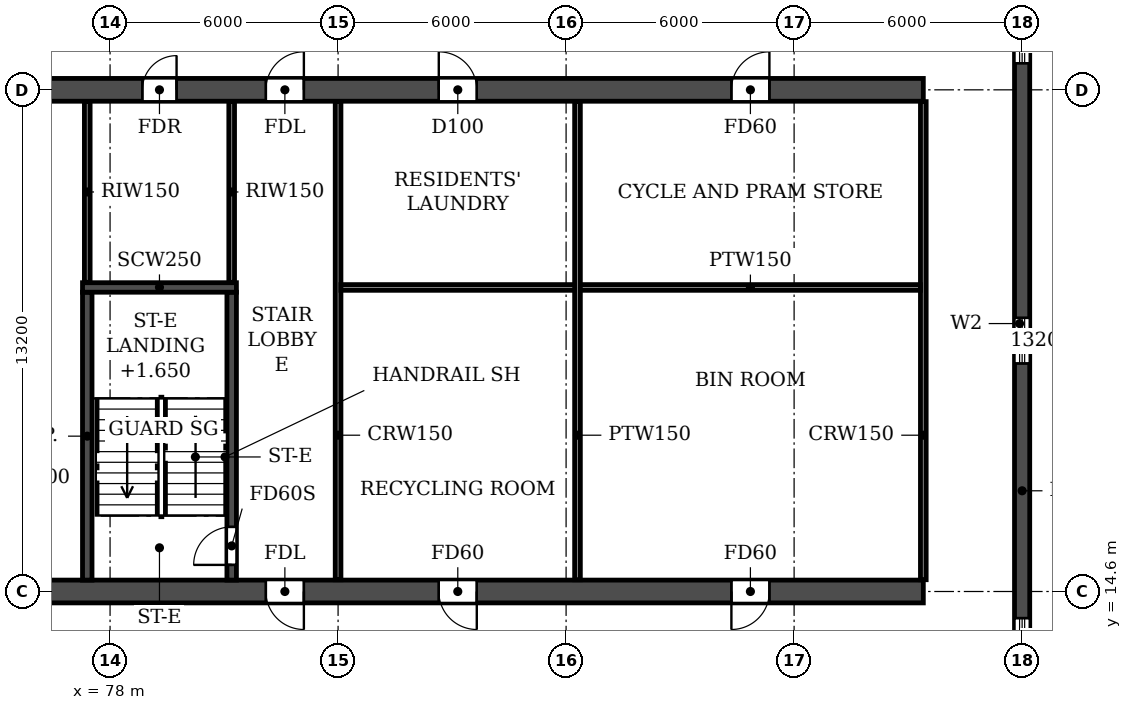
"""IFC4 building model, lengths in metres.
Left out: names, types, materials, properties, quantities, classifications, styles, units other than length and angle.
Written with IfcOpenShell. Run it as: python <this file> out.ifc"""

import sys

from ifc_helpers import new_model, si_unit, direction, frame, frame_2d, origin, place, context, subcontext, project, spatial, rectangle, extrude, element, fill, save


model = new_model("IFC4")
c1 = context("Model", 3, precision=1e-05, world=origin(), true_north=direction((0.0, 1.0)))
c2 = subcontext(c1, "Body", "Model", "MODEL_VIEW")
j1 = project(units=[si_unit("LENGTHUNIT", "METRE"), si_unit("PLANEANGLEUNIT", "RADIAN")], contexts=[c1])
p1 = place(None, origin())
s1 = spatial("IfcSite", under=j1, at=p1, CompositionType="ELEMENT")
p2 = place(p1, origin())
s2 = spatial("IfcBuilding", under=s1, at=p2, CompositionType="ELEMENT")
p3 = place(p2, frame((0.0, 0.0, 49.8)))
s3 = spatial("IfcBuildingStorey", under=s2, at=p3, CompositionType="ELEMENT", Elevation=49.8)
p4 = place(p3, frame((102.0, 4.683, 0.0), z_axis=(0.0, 0.0, 1.0), x_axis=(0.0, 1.0, 0.0)))
e1 = element("IfcWall", 1, at=p4, inside=s3, PredefinedType="SHEAR", context=c2, shape_type="SweptSolid", body=[
    extrude(rectangle(XDim=35.434, YDim=0.4, at=frame_2d((17.717, 0.0))), origin(), (0.0, 0.0, 1.0), 3.0),
])
p5 = place(p4, frame((15.917, 0.0, 0.9)))
e2 = element("IfcOpeningElement", 2, at=p5, cuts=e1, PredefinedType="OPENING", context=c2, shape_type="SweptSolid", body=[
    extrude(rectangle(XDim=1.2, YDim=1.5, at=frame_2d((0.6, 0.75))), frame((0.0, 0.21, 0.0), z_axis=(0.0, -1.0, 0.0), x_axis=(1.0, 0.0, 0.0)), (0.0, 0.0, 1.0), 0.42),
])
p6 = place(p4, frame((23.817, 0.0, 0.9)))
e3 = element("IfcOpeningElement", 3, at=p6, cuts=e1, PredefinedType="OPENING", context=c2, shape_type="SweptSolid", body=[
    extrude(rectangle(XDim=1.2, YDim=1.5, at=frame_2d((0.6, 0.75))), frame((0.0, 0.21, 0.0), z_axis=(0.0, -1.0, 0.0), x_axis=(1.0, 0.0, 0.0)), (0.0, 0.0, 1.0), 0.42),
])
p7 = place(p4, frame((8.017, 0.0, 0.9)))
e4 = element("IfcOpeningElement", 4, at=p7, cuts=e1, PredefinedType="OPENING", context=c2, shape_type="SweptSolid", body=[
    extrude(rectangle(XDim=1.2, YDim=1.5, at=frame_2d((0.6, 0.75))), frame((0.0, 0.21, 0.0), z_axis=(0.0, -1.0, 0.0), x_axis=(1.0, 0.0, 0.0)), (0.0, 0.0, 1.0), 0.42),
])
p8 = place(p4, frame((29.493, 0.0, 0.6)))
e5 = element("IfcOpeningElement", 5, at=p8, cuts=e1, PredefinedType="OPENING", context=c2, shape_type="SweptSolid", body=[
    extrude(rectangle(XDim=2.2, YDim=1.8, at=frame_2d((1.1, 0.9))), frame((0.0, 0.21, 0.0), z_axis=(0.0, -1.0, 0.0), x_axis=(1.0, 0.0, 0.0)), (0.0, 0.0, 1.0), 0.42),
])
p9 = place(p4, frame((2.541, 0.0, 0.6)))
e6 = element("IfcOpeningElement", 6, at=p9, cuts=e1, PredefinedType="OPENING", context=c2, shape_type="SweptSolid", body=[
    extrude(rectangle(XDim=2.2, YDim=1.8, at=frame_2d((1.1, 0.9))), frame((0.0, 0.21, 0.0), z_axis=(0.0, -1.0, 0.0), x_axis=(1.0, 0.0, 0.0)), (0.0, 0.0, 1.0), 0.42),
])
p10 = place(p3, frame((2.6, 14.6, 0.0), z_axis=(0.0, 0.0, 1.0), x_axis=(1.0, 0.0, 0.0)))
e7 = element("IfcWall", 7, at=p10, inside=s3, PredefinedType="SOLIDWALL", context=c2, shape_type="SweptSolid", body=[
    extrude(rectangle(XDim=96.8, YDim=0.6, at=frame_2d((48.4, 0.0))), origin(), (0.0, 0.0, 1.0), 3.0),
])
p11 = place(p10, frame((3.05, 0.0, 0.0)))
e8 = element("IfcOpeningElement", 8, at=p11, cuts=e7, PredefinedType="OPENING", context=c2, shape_type="SweptSolid", body=[
    extrude(rectangle(XDim=1.5, YDim=2.1, at=frame_2d((0.75, 1.05))), frame((0.0, 0.31, 0.0), z_axis=(0.0, -1.0, 0.0), x_axis=(1.0, 0.0, 0.0)), (0.0, 0.0, 1.0), 0.62),
])
p12 = place(p10, frame((10.75, 0.0, 0.0)))
e9 = element("IfcOpeningElement", 9, at=p12, cuts=e7, PredefinedType="OPENING", context=c2, shape_type="SweptSolid", body=[
    extrude(rectangle(XDim=1.5, YDim=2.1, at=frame_2d((0.75, 1.05))), frame((0.0, 0.31, 0.0), z_axis=(0.0, -1.0, 0.0), x_axis=(1.0, 0.0, 0.0)), (0.0, 0.0, 1.0), 0.62),
])
p13 = place(p10, frame((16.3, 0.0, 0.0)))
e10 = element("IfcOpeningElement", 10, at=p13, cuts=e7, PredefinedType="OPENING", context=c2, shape_type="SweptSolid", body=[
    extrude(rectangle(XDim=1.0, YDim=2.1, at=frame_2d((0.5, 1.05))), frame((0.0, 0.31, 0.0), z_axis=(0.0, -1.0, 0.0), x_axis=(1.0, 0.0, 0.0)), (0.0, 0.0, 1.0), 0.62),
])
p14 = place(p10, frame((24.2, 0.0, 0.0)))
e11 = element("IfcOpeningElement", 11, at=p14, cuts=e7, PredefinedType="OPENING", context=c2, shape_type="SweptSolid", body=[
    extrude(rectangle(XDim=1.0, YDim=2.1, at=frame_2d((0.5, 1.05))), frame((0.0, 0.31, 0.0), z_axis=(0.0, -1.0, 0.0), x_axis=(1.0, 0.0, 0.0)), (0.0, 0.0, 1.0), 0.62),
])
p15 = place(p10, frame((28.8, 0.0, 0.0)))
e12 = element("IfcOpeningElement", 12, at=p15, cuts=e7, PredefinedType="OPENING", context=c2, shape_type="SweptSolid", body=[
    extrude(rectangle(XDim=1.0, YDim=2.1, at=frame_2d((0.5, 1.05))), frame((0.0, 0.31, 0.0), z_axis=(0.0, -1.0, 0.0), x_axis=(1.0, 0.0, 0.0)), (0.0, 0.0, 1.0), 0.62),
])
p16 = place(p10, frame((42.7, 0.0, 0.0)))
e13 = element("IfcOpeningElement", 13, at=p16, cuts=e7, PredefinedType="OPENING", context=c2, shape_type="SweptSolid", body=[
    extrude(rectangle(XDim=1.0, YDim=2.1, at=frame_2d((0.5, 1.05))), frame((0.0, 0.31, 0.0), z_axis=(0.0, -1.0, 0.0), x_axis=(1.0, 0.0, 0.0)), (0.0, 0.0, 1.0), 0.62),
])
p17 = place(p10, frame((47.9, 0.0, 0.0)))
e14 = element("IfcOpeningElement", 14, at=p17, cuts=e7, PredefinedType="OPENING", context=c2, shape_type="SweptSolid", body=[
    extrude(rectangle(XDim=1.0, YDim=2.1, at=frame_2d((0.5, 1.05))), frame((0.0, 0.31, 0.0), z_axis=(0.0, -1.0, 0.0), x_axis=(1.0, 0.0, 0.0)), (0.0, 0.0, 1.0), 0.62),
])
p18 = place(p10, frame((51.8, 0.0, 0.0)))
e15 = element("IfcOpeningElement", 15, at=p18, cuts=e7, PredefinedType="OPENING", context=c2, shape_type="SweptSolid", body=[
    extrude(rectangle(XDim=1.0, YDim=2.1, at=frame_2d((0.5, 1.05))), frame((0.0, 0.31, 0.0), z_axis=(0.0, -1.0, 0.0), x_axis=(1.0, 0.0, 0.0)), (0.0, 0.0, 1.0), 0.62),
])
p19 = place(p10, frame((55.7, 0.0, 0.0)))
e16 = element("IfcOpeningElement", 16, at=p19, cuts=e7, PredefinedType="OPENING", context=c2, shape_type="SweptSolid", body=[
    extrude(rectangle(XDim=1.0, YDim=2.1, at=frame_2d((0.5, 1.05))), frame((0.0, 0.31, 0.0), z_axis=(0.0, -1.0, 0.0), x_axis=(1.0, 0.0, 0.0)), (0.0, 0.0, 1.0), 0.62),
])
p20 = place(p10, frame((67.0, 0.0, 0.0)))
e17 = element("IfcOpeningElement", 17, at=p20, cuts=e7, PredefinedType="OPENING", context=c2, shape_type="SweptSolid", body=[
    extrude(rectangle(XDim=1.0, YDim=2.1, at=frame_2d((0.5, 1.05))), frame((0.0, 0.31, 0.0), z_axis=(0.0, -1.0, 0.0), x_axis=(1.0, 0.0, 0.0)), (0.0, 0.0, 1.0), 0.62),
])
p21 = place(p10, frame((71.6, 0.0, 0.0)))
e18 = element("IfcOpeningElement", 18, at=p21, cuts=e7, PredefinedType="OPENING", context=c2, shape_type="SweptSolid", body=[
    extrude(rectangle(XDim=1.0, YDim=2.1, at=frame_2d((0.5, 1.05))), frame((0.0, 0.31, 0.0), z_axis=(0.0, -1.0, 0.0), x_axis=(1.0, 0.0, 0.0)), (0.0, 0.0, 1.0), 0.62),
])
p22 = place(p10, frame((79.5, 0.0, 0.0)))
e19 = element("IfcOpeningElement", 19, at=p22, cuts=e7, PredefinedType="OPENING", context=c2, shape_type="SweptSolid", body=[
    extrude(rectangle(XDim=1.0, YDim=2.1, at=frame_2d((0.5, 1.05))), frame((0.0, 0.31, 0.0), z_axis=(0.0, -1.0, 0.0), x_axis=(1.0, 0.0, 0.0)), (0.0, 0.0, 1.0), 0.62),
])
p23 = place(p10, frame((84.05, 0.0, 0.0)))
e20 = element("IfcOpeningElement", 20, at=p23, cuts=e7, PredefinedType="OPENING", context=c2, shape_type="SweptSolid", body=[
    extrude(rectangle(XDim=1.0, YDim=2.1, at=frame_2d((0.5, 1.05))), frame((0.0, 0.31, 0.0), z_axis=(0.0, -1.0, 0.0), x_axis=(1.0, 0.0, 0.0)), (0.0, 0.0, 1.0), 0.62),
])
p24 = place(p10, frame((91.75, 0.0, 0.0)))
e21 = element("IfcOpeningElement", 21, at=p24, cuts=e7, PredefinedType="OPENING", context=c2, shape_type="SweptSolid", body=[
    extrude(rectangle(XDim=1.0, YDim=2.1, at=frame_2d((0.5, 1.05))), frame((0.0, 0.31, 0.0), z_axis=(0.0, -1.0, 0.0), x_axis=(1.0, 0.0, 0.0)), (0.0, 0.0, 1.0), 0.62),
])
p25 = place(p3, frame((2.6, 27.8, 0.0), z_axis=(0.0, 0.0, 1.0), x_axis=(1.0, 0.0, 0.0)))
e22 = element("IfcWall", 22, at=p25, inside=s3, PredefinedType="SOLIDWALL", context=c2, shape_type="SweptSolid", body=[
    extrude(rectangle(XDim=96.8, YDim=0.6, at=frame_2d((48.4, 0.0))), origin(), (0.0, 0.0, 1.0), 3.0),
])
p26 = place(p25, frame((7.2, 0.0, 0.0)))
e23 = element("IfcOpeningElement", 23, at=p26, cuts=e22, PredefinedType="OPENING", context=c2, shape_type="SweptSolid", body=[
    extrude(rectangle(XDim=1.0, YDim=2.1, at=frame_2d((0.5, 1.05))), frame((0.0, 0.31, 0.0), z_axis=(0.0, -1.0, 0.0), x_axis=(1.0, 0.0, 0.0)), (0.0, 0.0, 1.0), 0.62),
])
p27 = place(p25, frame((16.3, 0.0, 0.0)))
e24 = element("IfcOpeningElement", 24, at=p27, cuts=e22, PredefinedType="OPENING", context=c2, shape_type="SweptSolid", body=[
    extrude(rectangle(XDim=1.0, YDim=2.1, at=frame_2d((0.5, 1.05))), frame((0.0, 0.31, 0.0), z_axis=(0.0, -1.0, 0.0), x_axis=(1.0, 0.0, 0.0)), (0.0, 0.0, 1.0), 0.62),
])
p28 = place(p25, frame((19.65, 0.0, 0.0)))
e25 = element("IfcOpeningElement", 25, at=p28, cuts=e22, PredefinedType="OPENING", context=c2, shape_type="SweptSolid", body=[
    extrude(rectangle(XDim=0.9, YDim=2.1, at=frame_2d((0.45, 1.05))), frame((0.0, 0.31, 0.0), z_axis=(0.0, -1.0, 0.0), x_axis=(1.0, 0.0, 0.0)), (0.0, 0.0, 1.0), 0.62),
])
p29 = place(p25, frame((28.85, 0.0, 0.0)))
e26 = element("IfcOpeningElement", 26, at=p29, cuts=e22, PredefinedType="OPENING", context=c2, shape_type="SweptSolid", body=[
    extrude(rectangle(XDim=0.9, YDim=2.1, at=frame_2d((0.45, 1.05))), frame((0.0, 0.31, 0.0), z_axis=(0.0, -1.0, 0.0), x_axis=(1.0, 0.0, 0.0)), (0.0, 0.0, 1.0), 0.62),
])
p30 = place(p25, frame((33.3, 0.0, 0.0)))
e27 = element("IfcOpeningElement", 27, at=p30, cuts=e22, PredefinedType="OPENING", context=c2, shape_type="SweptSolid", body=[
    extrude(rectangle(XDim=1.0, YDim=2.1, at=frame_2d((0.5, 1.05))), frame((0.0, 0.31, 0.0), z_axis=(0.0, -1.0, 0.0), x_axis=(1.0, 0.0, 0.0)), (0.0, 0.0, 1.0), 0.62),
])
p31 = place(p25, frame((38.25, 0.0, 0.0)))
e28 = element("IfcOpeningElement", 28, at=p31, cuts=e22, PredefinedType="OPENING", context=c2, shape_type="SweptSolid", body=[
    extrude(rectangle(XDim=1.5, YDim=2.1, at=frame_2d((0.75, 1.05))), frame((0.0, 0.31, 0.0), z_axis=(0.0, -1.0, 0.0), x_axis=(1.0, 0.0, 0.0)), (0.0, 0.0, 1.0), 0.62),
])
p32 = place(p25, frame((45.0, 0.0, 0.0)))
e29 = element("IfcOpeningElement", 29, at=p32, cuts=e22, PredefinedType="OPENING", context=c2, shape_type="SweptSolid", body=[
    extrude(rectangle(XDim=1.0, YDim=2.1, at=frame_2d((0.5, 1.05))), frame((0.0, 0.31, 0.0), z_axis=(0.0, -1.0, 0.0), x_axis=(1.0, 0.0, 0.0)), (0.0, 0.0, 1.0), 0.62),
])
p33 = place(p25, frame((47.9, 0.0, 0.0)))
e30 = element("IfcOpeningElement", 30, at=p33, cuts=e22, PredefinedType="OPENING", context=c2, shape_type="SweptSolid", body=[
    extrude(rectangle(XDim=1.0, YDim=2.1, at=frame_2d((0.5, 1.05))), frame((0.0, 0.31, 0.0), z_axis=(0.0, -1.0, 0.0), x_axis=(1.0, 0.0, 0.0)), (0.0, 0.0, 1.0), 0.62),
])
p34 = place(p25, frame((52.1, 0.0, 0.0)))
e31 = element("IfcOpeningElement", 31, at=p34, cuts=e22, PredefinedType="OPENING", context=c2, shape_type="SweptSolid", body=[
    extrude(rectangle(XDim=1.0, YDim=2.1, at=frame_2d((0.5, 1.05))), frame((0.0, 0.31, 0.0), z_axis=(0.0, -1.0, 0.0), x_axis=(1.0, 0.0, 0.0)), (0.0, 0.0, 1.0), 0.62),
])
p35 = place(p25, frame((56.0, 0.0, 0.0)))
e32 = element("IfcOpeningElement", 32, at=p35, cuts=e22, PredefinedType="OPENING", context=c2, shape_type="SweptSolid", body=[
    extrude(rectangle(XDim=1.0, YDim=2.1, at=frame_2d((0.5, 1.05))), frame((0.0, 0.31, 0.0), z_axis=(0.0, -1.0, 0.0), x_axis=(1.0, 0.0, 0.0)), (0.0, 0.0, 1.0), 0.62),
])
p36 = place(p25, frame((61.2, 0.0, 0.0)))
e33 = element("IfcOpeningElement", 33, at=p36, cuts=e22, PredefinedType="OPENING", context=c2, shape_type="SweptSolid", body=[
    extrude(rectangle(XDim=1.0, YDim=2.1, at=frame_2d((0.5, 1.05))), frame((0.0, 0.31, 0.0), z_axis=(0.0, -1.0, 0.0), x_axis=(1.0, 0.0, 0.0)), (0.0, 0.0, 1.0), 0.62),
])
p37 = place(p25, frame((67.05, 0.0, 0.0)))
e34 = element("IfcOpeningElement", 34, at=p37, cuts=e22, PredefinedType="OPENING", context=c2, shape_type="SweptSolid", body=[
    extrude(rectangle(XDim=0.9, YDim=2.1, at=frame_2d((0.45, 1.05))), frame((0.0, 0.31, 0.0), z_axis=(0.0, -1.0, 0.0), x_axis=(1.0, 0.0, 0.0)), (0.0, 0.0, 1.0), 0.62),
])
p38 = place(p25, frame((76.25, 0.0, 0.0)))
e35 = element("IfcOpeningElement", 35, at=p38, cuts=e22, PredefinedType="OPENING", context=c2, shape_type="SweptSolid", body=[
    extrude(rectangle(XDim=0.9, YDim=2.1, at=frame_2d((0.45, 1.05))), frame((0.0, 0.31, 0.0), z_axis=(0.0, -1.0, 0.0), x_axis=(1.0, 0.0, 0.0)), (0.0, 0.0, 1.0), 0.62),
])
p39 = place(p25, frame((79.5, 0.0, 0.0)))
e36 = element("IfcOpeningElement", 36, at=p39, cuts=e22, PredefinedType="OPENING", context=c2, shape_type="SweptSolid", body=[
    extrude(rectangle(XDim=1.0, YDim=2.1, at=frame_2d((0.5, 1.05))), frame((0.0, 0.31, 0.0), z_axis=(0.0, -1.0, 0.0), x_axis=(1.0, 0.0, 0.0)), (0.0, 0.0, 1.0), 0.62),
])
p40 = place(p25, frame((84.05, 0.0, 0.0)))
e37 = element("IfcOpeningElement", 37, at=p40, cuts=e22, PredefinedType="OPENING", context=c2, shape_type="SweptSolid", body=[
    extrude(rectangle(XDim=1.0, YDim=2.1, at=frame_2d((0.5, 1.05))), frame((0.0, 0.31, 0.0), z_axis=(0.0, -1.0, 0.0), x_axis=(1.0, 0.0, 0.0)), (0.0, 0.0, 1.0), 0.62),
])
p41 = place(p25, frame((91.75, 0.0, 0.0)))
e38 = element("IfcOpeningElement", 38, at=p41, cuts=e22, PredefinedType="OPENING", context=c2, shape_type="SweptSolid", body=[
    extrude(rectangle(XDim=1.0, YDim=2.1, at=frame_2d((0.5, 1.05))), frame((0.0, 0.31, 0.0), z_axis=(0.0, -1.0, 0.0), x_axis=(1.0, 0.0, 0.0)), (0.0, 0.0, 1.0), 0.62),
])
p42 = place(p3, frame((77.4, 14.9, 0.0), z_axis=(0.0, 0.0, 1.0), x_axis=(0.0, 1.0, 0.0)))
e39 = element("IfcWall", 39, at=p42, inside=s3, PredefinedType="SOLIDWALL", context=c2, shape_type="SweptSolid", body=[
    extrude(rectangle(XDim=7.575, YDim=0.25, at=frame_2d((3.788, 0.0))), origin(), (0.0, 0.0, 1.0), 3.0),
])
p43 = place(p3, frame((81.2, 14.9, 0.0), z_axis=(0.0, 0.0, 1.0), x_axis=(0.0, 1.0, 0.0)))
e40 = element("IfcWall", 40, at=p43, inside=s3, PredefinedType="SOLIDWALL", context=c2, shape_type="SweptSolid", body=[
    extrude(rectangle(XDim=7.575, YDim=0.25, at=frame_2d((3.788, 0.0))), origin(), (0.0, 0.0, 1.0), 3.0),
])
p44 = place(p43, frame((0.4, 0.0, 0.0)))
e41 = element("IfcOpeningElement", 41, at=p44, cuts=e40, PredefinedType="OPENING", context=c2, shape_type="SweptSolid", body=[
    extrude(rectangle(XDim=1.0, YDim=2.1, at=frame_2d((0.5, 1.05))), frame((0.0, 0.135, 0.0), z_axis=(0.0, -1.0, 0.0), x_axis=(1.0, 0.0, 0.0)), (0.0, 0.0, 1.0), 0.27),
])
p45 = place(p3, frame((77.275, 22.6, 0.0), z_axis=(0.0, 0.0, 1.0), x_axis=(1.0, 0.0, 0.0)))
e42 = element("IfcWall", 42, at=p45, inside=s3, PredefinedType="SOLIDWALL", context=c2, shape_type="SweptSolid", body=[
    extrude(rectangle(XDim=4.05, YDim=0.25, at=frame_2d((2.025, 0.0))), origin(), (0.0, 0.0, 1.0), 3.0),
])
for number, where, z_axis, x_axis in (
    (43, (84.0, 14.91, 0.0), (0.0, 0.0, 1.0), (0.0, 1.0, 0.0)),
    (44, (99.4, 14.91, 0.0), (0.0, 0.0, 1.0), (0.0, 1.0, 0.0)),
):
    element("IfcWall", number, at=place(p3, frame(where, z_axis=z_axis, x_axis=x_axis)), inside=s3, PredefinedType="PARTITIONING", context=c2, shape_type="SweptSolid", body=[
        extrude(rectangle(XDim=12.58, YDim=0.15, at=frame_2d((6.29, 0.0))), origin(), (0.0, 0.0, 1.0), 3.0),
    ])
p46 = place(p3, frame((84.075, 22.6, 0.0), z_axis=(0.0, 0.0, 1.0), x_axis=(1.0, 0.0, 0.0)))
e45 = element("IfcWall", 45, at=p46, inside=s3, PredefinedType="PARTITIONING", context=c2, shape_type="SweptSolid", body=[
    extrude(rectangle(XDim=15.25, YDim=0.15, at=frame_2d((7.625, 0.0))), origin(), (0.0, 0.0, 1.0), 3.0),
])
p47 = place(p3, frame((90.3, 14.91, 0.0), z_axis=(0.0, 0.0, 1.0), x_axis=(0.0, 1.0, 0.0)))
e46 = element("IfcWall", 46, at=p47, inside=s3, PredefinedType="PARTITIONING", context=c2, shape_type="SweptSolid", body=[
    extrude(rectangle(XDim=12.58, YDim=0.15, at=frame_2d((6.29, 0.0))), origin(), (0.0, 0.0, 1.0), 3.0),
])
for number, where, z_axis, x_axis in (
    (47, (77.4, 22.735, 0.0), (0.0, 0.0, 1.0), (0.0, 1.0, 0.0)),
    (48, (81.2, 22.735, 0.0), (0.0, 0.0, 1.0), (0.0, 1.0, 0.0)),
):
    element("IfcWall", number, at=place(p3, frame(where, z_axis=z_axis, x_axis=x_axis)), inside=s3, PredefinedType="PARTITIONING", context=c2, shape_type="SweptSolid", body=[
        extrude(rectangle(XDim=4.755, YDim=0.15, at=frame_2d((2.377, 0.0))), origin(), (0.0, 0.0, 1.0), 3.0),
    ])
p48 = place(p5, origin())
e49 = element("IfcWindow", 49, at=p48, inside=s3, PartitioningType="SINGLE_PANEL", PredefinedType="WINDOW", context=c2, shape_type="SweptSolid", body=[
    extrude(rectangle(XDim=1.2, YDim=1.5, at=frame_2d((0.6, 0.75))), frame((0.0, 0.03, 0.0), z_axis=(0.0, -1.0, 0.0), x_axis=(1.0, 0.0, 0.0)), (0.0, 0.0, 1.0), 0.06),
])
fill(e2, e49)
p49 = place(p6, origin())
e50 = element("IfcWindow", 50, at=p49, inside=s3, PartitioningType="SINGLE_PANEL", PredefinedType="WINDOW", context=c2, shape_type="SweptSolid", body=[
    extrude(rectangle(XDim=1.2, YDim=1.5, at=frame_2d((0.6, 0.75))), frame((0.0, 0.03, 0.0), z_axis=(0.0, -1.0, 0.0), x_axis=(1.0, 0.0, 0.0)), (0.0, 0.0, 1.0), 0.06),
])
fill(e3, e50)
p50 = place(p7, origin())
e51 = element("IfcWindow", 51, at=p50, inside=s3, PartitioningType="SINGLE_PANEL", PredefinedType="WINDOW", context=c2, shape_type="SweptSolid", body=[
    extrude(rectangle(XDim=1.2, YDim=1.5, at=frame_2d((0.6, 0.75))), frame((0.0, 0.03, 0.0), z_axis=(0.0, -1.0, 0.0), x_axis=(1.0, 0.0, 0.0)), (0.0, 0.0, 1.0), 0.06),
])
fill(e4, e51)
p51 = place(p38, origin())
e52 = element("IfcDoor", 52, at=p51, inside=s3, OperationType="SINGLE_SWING_RIGHT", PredefinedType="DOOR", context=c2, shape_type="SweptSolid", body=[
    extrude(rectangle(XDim=0.9, YDim=2.1, at=frame_2d((0.45, 1.05))), frame((0.0, 0.025, 0.0), z_axis=(0.0, -1.0, 0.0), x_axis=(1.0, 0.0, 0.0)), (0.0, 0.0, 1.0), 0.05),
])
fill(e35, e52)
p52 = place(p39, origin())
e53 = element("IfcDoor", 53, at=p52, inside=s3, OperationType="SINGLE_SWING_RIGHT", PredefinedType="DOOR", context=c2, shape_type="SweptSolid", body=[
    extrude(rectangle(XDim=1.0, YDim=2.1, at=frame_2d((0.5, 1.05))), frame((0.0, 0.025, 0.0), z_axis=(0.0, -1.0, 0.0), x_axis=(1.0, 0.0, 0.0)), (0.0, 0.0, 1.0), 0.05),
])
fill(e36, e53)
p53 = place(p40, origin())
e54 = element("IfcDoor", 54, at=p53, inside=s3, OperationType="SINGLE_SWING_LEFT", PredefinedType="DOOR", context=c2, shape_type="SweptSolid", body=[
    extrude(rectangle(XDim=1.0, YDim=2.1, at=frame_2d((0.5, 1.05))), frame((0.0, 0.025, 0.0), z_axis=(0.0, -1.0, 0.0), x_axis=(1.0, 0.0, 0.0)), (0.0, 0.0, 1.0), 0.05),
])
fill(e37, e54)
p54 = place(p41, origin())
e55 = element("IfcDoor", 55, at=p54, inside=s3, OperationType="SINGLE_SWING_RIGHT", PredefinedType="DOOR", context=c2, shape_type="SweptSolid", body=[
    extrude(rectangle(XDim=1.0, YDim=2.1, at=frame_2d((0.5, 1.05))), frame((0.0, 0.025, 0.0), z_axis=(0.0, -1.0, 0.0), x_axis=(1.0, 0.0, 0.0)), (0.0, 0.0, 1.0), 0.05),
])
fill(e38, e55)
p55 = place(p22, frame((1.0, 0.0, 0.0), z_axis=(0.0, 0.0, 1.0), x_axis=(-1.0, 0.0, 0.0)))
e56 = element("IfcDoor", 56, at=p55, inside=s3, OperationType="SINGLE_SWING_LEFT", PredefinedType="DOOR", context=c2, shape_type="SweptSolid", body=[
    extrude(rectangle(XDim=1.0, YDim=2.1, at=frame_2d((0.5, 1.05))), frame((0.0, 0.025, 0.0), z_axis=(0.0, -1.0, 0.0), x_axis=(1.0, 0.0, 0.0)), (0.0, 0.0, 1.0), 0.05),
])
fill(e19, e56)
p56 = place(p23, frame((1.0, 0.0, 0.0), z_axis=(0.0, 0.0, 1.0), x_axis=(-1.0, 0.0, 0.0)))
e57 = element("IfcDoor", 57, at=p56, inside=s3, OperationType="SINGLE_SWING_LEFT", PredefinedType="DOOR", context=c2, shape_type="SweptSolid", body=[
    extrude(rectangle(XDim=1.0, YDim=2.1, at=frame_2d((0.5, 1.05))), frame((0.0, 0.025, 0.0), z_axis=(0.0, -1.0, 0.0), x_axis=(1.0, 0.0, 0.0)), (0.0, 0.0, 1.0), 0.05),
])
fill(e20, e57)
p57 = place(p24, frame((1.0, 0.0, 0.0), z_axis=(0.0, 0.0, 1.0), x_axis=(-1.0, 0.0, 0.0)))
e58 = element("IfcDoor", 58, at=p57, inside=s3, OperationType="SINGLE_SWING_RIGHT", PredefinedType="DOOR", context=c2, shape_type="SweptSolid", body=[
    extrude(rectangle(XDim=1.0, YDim=2.1, at=frame_2d((0.5, 1.05))), frame((0.0, 0.025, 0.0), z_axis=(0.0, -1.0, 0.0), x_axis=(1.0, 0.0, 0.0)), (0.0, 0.0, 1.0), 0.05),
])
fill(e21, e58)
p58 = place(p44, origin())
e59 = element("IfcDoor", 59, at=p58, inside=s3, OperationType="SINGLE_SWING_LEFT", PredefinedType="DOOR", context=c2, shape_type="SweptSolid", body=[
    extrude(rectangle(XDim=1.0, YDim=2.1, at=frame_2d((0.5, 1.05))), frame((0.0, 0.025, 0.0), z_axis=(0.0, -1.0, 0.0), x_axis=(1.0, 0.0, 0.0)), (0.0, 0.0, 1.0), 0.05),
])
fill(e41, e59)
save(model, sys.argv[1])
